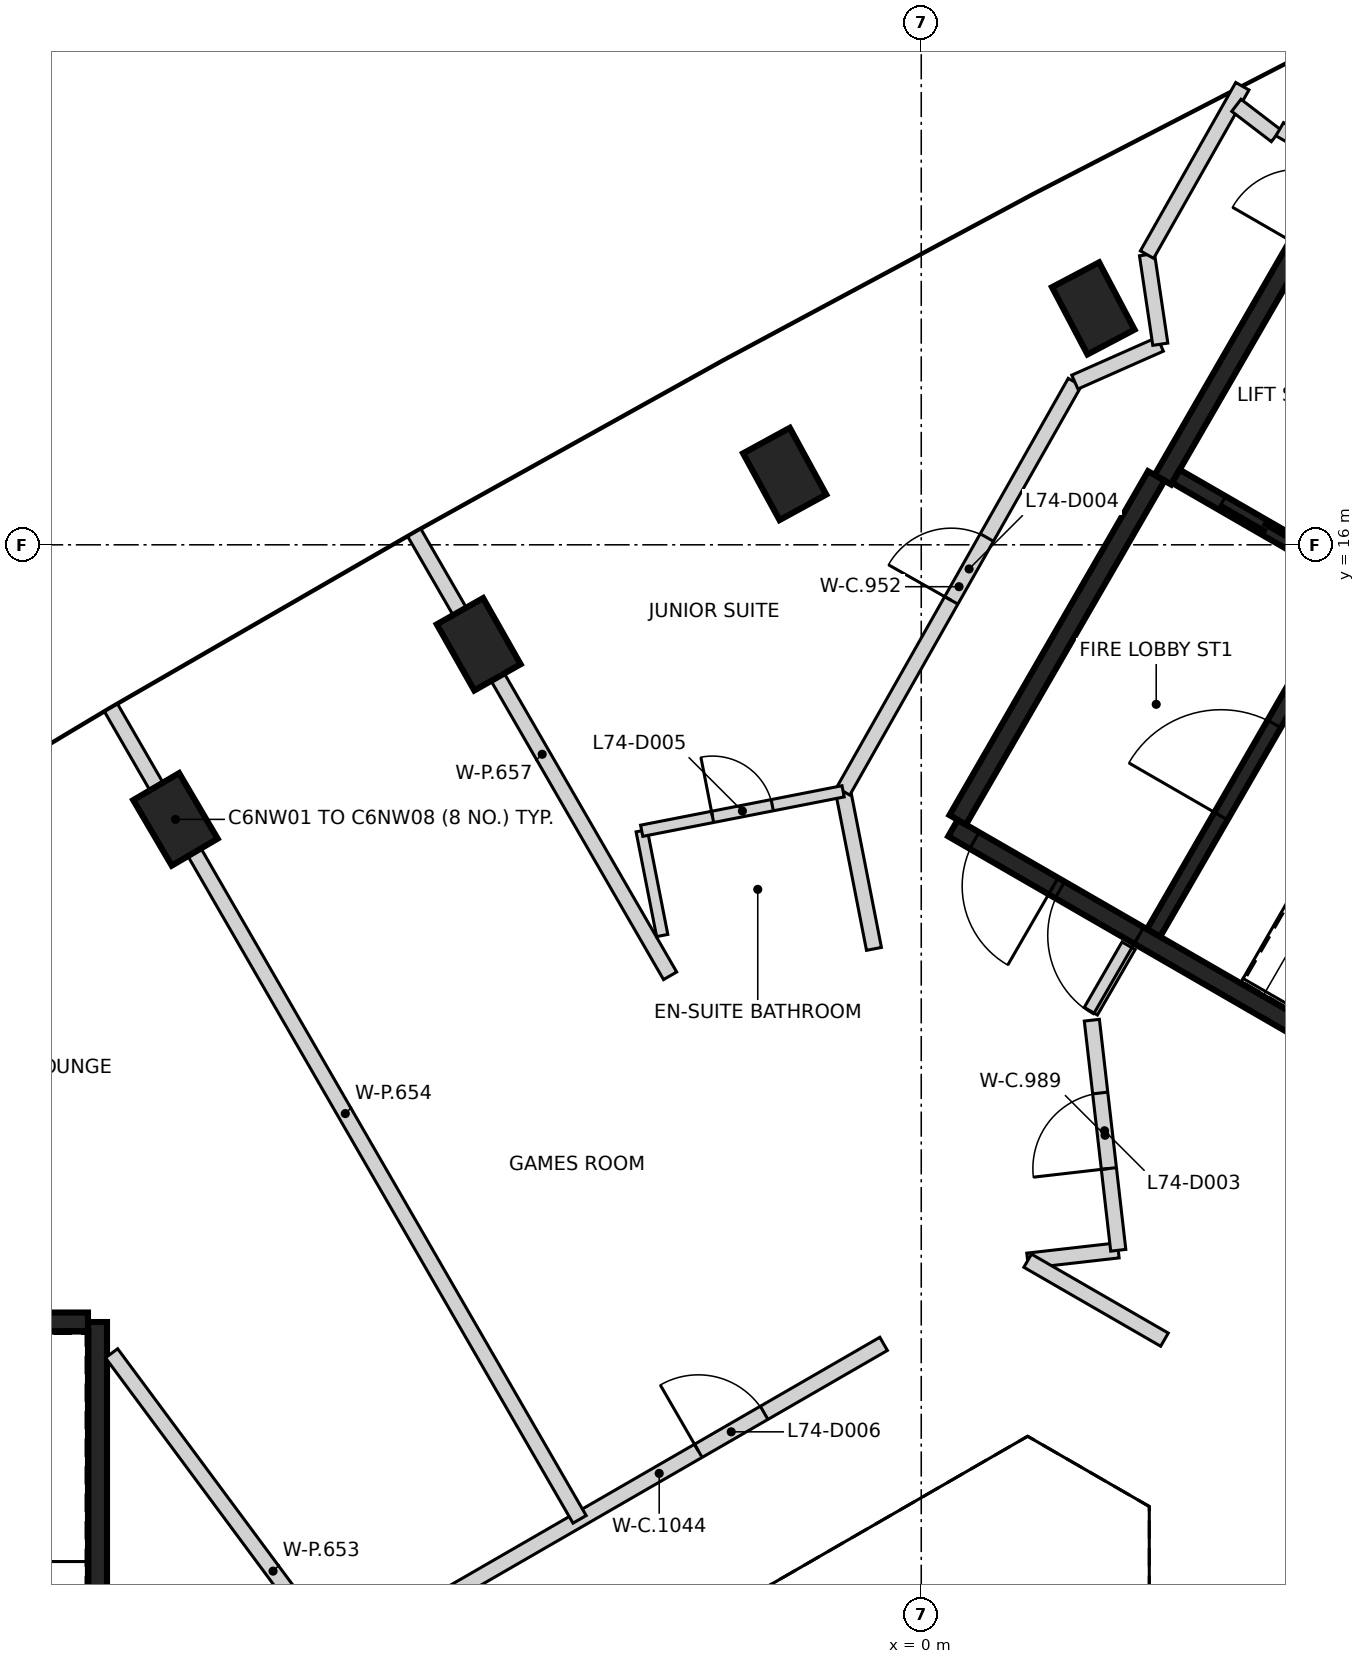
"""IFC4 building model, lengths in metres.
Left out: names, types, materials, properties, quantities, classifications, styles, units other than length and angle.
Written with IfcOpenShell. Run it as: python <this file> out.ifc"""

import sys

from ifc_helpers import new_model, si_unit, direction, frame, frame_2d, origin, origin_2d, place, context, subcontext, project, spatial, rectangle, extrude, element, fill, save


model = new_model("IFC4")
c1 = context("Model", 3, precision=1e-05, world=origin(), true_north=direction((0.0, 1.0)))
c2 = subcontext(c1, "Body", "Model", "MODEL_VIEW")
j1 = project(units=[si_unit("LENGTHUNIT", "METRE"), si_unit("PLANEANGLEUNIT", "RADIAN")], contexts=[c1])
p1 = place(None, origin())
s1 = spatial("IfcSite", under=j1, at=p1, CompositionType="ELEMENT")
p2 = place(p1, origin())
s2 = spatial("IfcBuilding", under=s1, at=p2, CompositionType="ELEMENT")
p3 = place(p2, frame((0.0, 0.0, 294.6)))
s3 = spatial("IfcBuildingStorey", under=s2, at=p3, CompositionType="ELEMENT", Elevation=294.6)
for number, where, z_axis, x_axis in (
    (1, (2.263, 19.11, -0.35), (0.0, 0.0, 1.0), (-0.466, 0.885, 0.0)),
    (2, (-1.797, 16.932, -0.35), (0.0, 0.0, 1.0), (-0.479, 0.878, 0.0)),
    (3, (-5.822, 14.691, -0.35), (0.0, 0.0, 1.0), (-0.493, 0.87, 0.0)),
    (4, (-9.812, 12.388, -0.35), (0.0, 0.0, 1.0), (-0.507, 0.862, 0.0)),
):
    element("IfcColumn", number, at=place(p3, frame(where, z_axis=z_axis, x_axis=x_axis)), inside=s3, PredefinedType="COLUMN", context=c2, shape_type="SweptSolid", body=[
        extrude(rectangle(XDim=1.0, YDim=0.7, at=origin_2d()), origin(), (0.0, 0.0, 1.0), 3.6),
    ])
p4 = place(p3, frame((-10.837, 5.775, 0.0), z_axis=(0.0, 0.0, 1.0), x_axis=(0.0, -1.0, 0.0)))
e5 = element("IfcWall", 5, at=p4, inside=s3, PredefinedType="SHEAR", context=c2, shape_type="SweptSolid", body=[
    extrude(rectangle(XDim=11.55, YDim=0.25, at=frame_2d((5.775, 0.0))), origin(), (0.0, 0.0, 1.0), 3.25),
])
p5 = place(p4, frame((10.025, 0.0, 0.0)))
e6 = element("IfcOpeningElement", 6, at=p5, cuts=e5, PredefinedType="OPENING", context=c2, shape_type="SweptSolid", body=[
    extrude(rectangle(XDim=1.2, YDim=2.1, at=frame_2d((0.6, 1.05))), frame((0.0, 0.135, 0.0), z_axis=(0.0, -1.0, 0.0), x_axis=(1.0, 0.0, 0.0)), (0.0, 0.0, 1.0), 0.27),
])
p6 = place(p4, frame((8.725, 0.0, 0.0)))
e7 = element("IfcOpeningElement", 7, at=p6, cuts=e5, PredefinedType="OPENING", context=c2, shape_type="SweptSolid", body=[
    extrude(rectangle(XDim=1.2, YDim=2.1, at=frame_2d((0.6, 1.05))), frame((0.0, 0.135, 0.0), z_axis=(0.0, -1.0, 0.0), x_axis=(1.0, 0.0, 0.0)), (0.0, 0.0, 1.0), 0.27),
])
p7 = place(p3, frame((-16.472, 5.775, 0.0), z_axis=(0.0, 0.0, 1.0), x_axis=(1.0, 0.0, 0.0)))
e8 = element("IfcWall", 8, at=p7, inside=s3, PredefinedType="SHEAR", context=c2, shape_type="SweptSolid", body=[
    extrude(rectangle(XDim=5.51, YDim=0.25, at=frame_2d((2.755, 0.0))), origin(), (0.0, 0.0, 1.0), 3.25),
])
p8 = place(p3, frame((10.42, 6.498, 0.0), z_axis=(0.0, 0.0, 1.0), x_axis=(-0.866021906294, 0.500006057782, 0.0)))
e9 = element("IfcWall", 9, at=p8, inside=s3, PredefinedType="SHEAR", context=c2, shape_type="SweptSolid", body=[
    extrude(rectangle(XDim=11.55, YDim=0.25, at=frame_2d((5.775, 0.0))), origin(), (0.0, 0.0, 1.0), 3.25),
])
p9 = place(p8, frame((10.025, 0.0, 0.0)))
e10 = element("IfcOpeningElement", 10, at=p9, cuts=e9, PredefinedType="OPENING", context=c2, shape_type="SweptSolid", body=[
    extrude(rectangle(XDim=1.2, YDim=2.1, at=frame_2d((0.6, 1.05))), frame((0.0, 0.135, 0.0), z_axis=(0.0, -1.0, 0.0), x_axis=(1.0, 0.0, 0.0)), (0.0, 0.0, 1.0), 0.27),
])
p10 = place(p8, frame((8.725, 0.0, 0.0)))
e11 = element("IfcOpeningElement", 11, at=p10, cuts=e9, PredefinedType="OPENING", context=c2, shape_type="SweptSolid", body=[
    extrude(rectangle(XDim=1.2, YDim=2.1, at=frame_2d((0.6, 1.05))), frame((0.0, 0.135, 0.0), z_axis=(0.0, -1.0, 0.0), x_axis=(1.0, 0.0, 0.0)), (0.0, 0.0, 1.0), 0.27),
])
p11 = place(p3, frame((3.179, 16.856, 0.0), z_axis=(0.0, 0.0, 1.0), x_axis=(0.500001955336, 0.866024274868, 0.0)))
e12 = element("IfcWall", 12, at=p11, inside=s3, PredefinedType="SHEAR", context=c2, shape_type="SweptSolid", body=[
    extrude(rectangle(XDim=6.125, YDim=0.25, at=frame_2d((3.062, 0.0))), origin(), (0.0, 0.0, 1.0), 3.25),
])
p12 = place(p11, frame((3.563, 0.0, 0.0)))
e13 = element("IfcOpeningElement", 13, at=p12, cuts=e12, PredefinedType="OPENING", context=c2, shape_type="SweptSolid", body=[
    extrude(rectangle(XDim=1.0, YDim=2.1, at=frame_2d((0.5, 1.05))), frame((0.0, 0.135, 0.0), z_axis=(0.0, -1.0, 0.0), x_axis=(1.0, 0.0, 0.0)), (0.0, 0.0, 1.0), 0.27),
])
p13 = place(p3, frame((0.48, 12.381, 0.0), z_axis=(0.0, 0.0, 1.0), x_axis=(0.49999885962, 0.866026062182, 0.0)))
e14 = element("IfcWall", 14, at=p13, inside=s3, PredefinedType="SHEAR", context=c2, shape_type="SweptSolid", body=[
    extrude(rectangle(XDim=5.225, YDim=0.25, at=frame_2d((2.612, 0.0))), origin(), (0.0, 0.0, 1.0), 3.25),
])
p14 = place(p3, frame((3.057, 10.895, 0.0), z_axis=(0.0, 0.0, 1.0), x_axis=(0.500027839223, 0.866009330205, 0.0)))
e15 = element("IfcWall", 15, at=p14, inside=s3, PredefinedType="SHEAR", context=c2, shape_type="SweptSolid", body=[
    extrude(rectangle(XDim=5.098, YDim=0.2, at=frame_2d((2.549, 0.0))), origin(), (0.0, 0.0, 1.0), 3.25),
])
p15 = place(p14, frame((1.774, 0.0, 0.0)))
e16 = element("IfcOpeningElement", 16, at=p15, cuts=e15, PredefinedType="OPENING", context=c2, shape_type="SweptSolid", body=[
    extrude(rectangle(XDim=1.4, YDim=2.1, at=frame_2d((0.7, 1.05))), frame((0.0, 0.11, 0.0), z_axis=(0.0, -1.0, 0.0), x_axis=(1.0, 0.0, 0.0)), (0.0, 0.0, 1.0), 0.22),
])
p16 = place(p3, frame((5.646, 15.576, 0.0), z_axis=(0.0, 0.0, 1.0), x_axis=(-0.866018407898, 0.500012117035, 0.0)))
e17 = element("IfcWall", 17, at=p16, inside=s3, PredefinedType="SHEAR", context=c2, shape_type="SweptSolid", body=[
    extrude(rectangle(XDim=2.651, YDim=0.2, at=frame_2d((1.325, 0.0))), origin(), (0.0, 0.0, 1.0), 3.25),
])
p17 = place(p16, frame((0.652, 0.0, 0.0)))
e18 = element("IfcOpeningElement", 18, at=p17, cuts=e17, PredefinedType="OPENING", context=c2, shape_type="SweptSolid", body=[
    extrude(rectangle(XDim=1.3, YDim=2.1, at=frame_2d((0.65, 1.05))), frame((0.0, 0.11, 0.0), z_axis=(0.0, -1.0, 0.0), x_axis=(1.0, 0.0, 0.0)), (0.0, 0.0, 1.0), 0.22),
])
p18 = place(p3, frame((-6.4, 2.079, 0.0), z_axis=(0.0, 0.0, 1.0), x_axis=(0.866037708501, 0.499978687001, 0.0)))
e19 = element("IfcWall", 19, at=p18, inside=s3, PredefinedType="PARTITIONING", context=c2, shape_type="SweptSolid", body=[
    extrude(rectangle(XDim=6.818, YDim=0.2, at=frame_2d((3.409, 0.0))), origin(), (0.0, 0.0, 1.0), 3.25),
])
p19 = place(p18, frame((4.003, 0.0, 0.0)))
e20 = element("IfcOpeningElement", 20, at=p19, cuts=e19, PredefinedType="OPENING", context=c2, shape_type="SweptSolid", body=[
    extrude(rectangle(XDim=1.0, YDim=2.1, at=frame_2d((0.5, 1.05))), frame((0.0, 0.11, 0.0), z_axis=(0.0, -1.0, 0.0), x_axis=(1.0, 0.0, 0.0)), (0.0, 0.0, 1.0), 0.22),
])
p20 = place(p3, frame((-1.028, 12.757, 0.0), z_axis=(0.0, 0.0, 1.0), x_axis=(0.192202773855, -0.981355233197, 0.0)))
e21 = element("IfcWall", 21, at=p20, inside=s3, PredefinedType="PARTITIONING", context=c2, shape_type="SweptSolid", body=[
    extrude(rectangle(XDim=2.112, YDim=0.2, at=frame_2d((1.056, 0.0))), origin(), (0.0, 0.0, 1.0), 3.25),
])
p21 = place(p3, frame((-1.027, 12.757, 0.0), z_axis=(0.0, 0.0, 1.0), x_axis=(0.492663063759, 0.870220147783, 0.0)))
e22 = element("IfcWall", 22, at=p21, inside=s3, PredefinedType="PARTITIONING", context=c2, shape_type="SweptSolid", body=[
    extrude(rectangle(XDim=6.187, YDim=0.2, at=frame_2d((3.094, 0.0))), origin(), (0.0, 0.0, 1.0), 3.25),
])
p22 = place(p21, frame((2.887, 0.0, 0.0)))
e23 = element("IfcOpeningElement", 23, at=p22, cuts=e22, PredefinedType="OPENING", context=c2, shape_type="SweptSolid", body=[
    extrude(rectangle(XDim=0.95, YDim=2.1, at=frame_2d((0.475, 1.05))), frame((0.0, 0.11, 0.0), z_axis=(0.0, -1.0, 0.0), x_axis=(1.0, 0.0, 0.0)), (0.0, 0.0, 1.0), 0.22),
])
p23 = place(p3, frame((1.4, 6.582, 0.0), z_axis=(0.0, 0.0, 1.0), x_axis=(0.993556915844, 0.11333426216, 0.0)))
e24 = element("IfcWall", 24, at=p23, inside=s3, PredefinedType="PARTITIONING", context=c2, shape_type="SweptSolid", body=[
    extrude(rectangle(XDim=1.2, YDim=0.2, at=frame_2d((0.6, 0.0))), origin(), (0.0, 0.0, 1.0), 3.25),
])
p24 = place(p3, frame((1.4, 6.582, 0.0), z_axis=(0.0, 0.0, 1.0), x_axis=(0.866066271601, -0.499929208183, 0.0)))
e25 = element("IfcWall", 25, at=p24, inside=s3, PredefinedType="PARTITIONING", context=c2, shape_type="SweptSolid", body=[
    extrude(rectangle(XDim=2.078, YDim=0.2, at=frame_2d((1.039, 0.0))), origin(), (0.0, 0.0, 1.0), 3.25),
])
p25 = place(p3, frame((2.021, 18.141, 0.0), z_axis=(0.0, 0.0, 1.0), x_axis=(0.914343087003, 0.404940389748, 0.0)))
e26 = element("IfcWall", 26, at=p25, inside=s3, PredefinedType="PARTITIONING", context=c2, shape_type="SweptSolid", body=[
    extrude(rectangle(XDim=1.229, YDim=0.2, at=frame_2d((0.615, 0.0))), origin(), (0.0, 0.0, 1.0), 3.25),
])
p26 = place(p3, frame((2.592, 6.719, 0.0), z_axis=(0.0, 0.0, 1.0), x_axis=(-0.114027951455, 0.993477541914, 0.0)))
e27 = element("IfcWall", 27, at=p26, inside=s3, PredefinedType="PARTITIONING", context=c2, shape_type="SweptSolid", body=[
    extrude(rectangle(XDim=3.047, YDim=0.2, at=frame_2d((1.523, 0.0))), origin(), (0.0, 0.0, 1.0), 3.25),
])
p27 = place(p26, frame((1.083, 0.0, 0.0)))
e28 = element("IfcOpeningElement", 28, at=p27, cuts=e27, PredefinedType="OPENING", context=c2, shape_type="SweptSolid", body=[
    extrude(rectangle(XDim=1.0, YDim=2.1, at=frame_2d((0.5, 1.05))), frame((0.0, 0.11, 0.0), z_axis=(0.0, -1.0, 0.0), x_axis=(1.0, 0.0, 0.0)), (0.0, 0.0, 1.0), 0.22),
])
p28 = place(p3, frame((2.231, 9.864, 0.0), z_axis=(0.0, 0.0, 1.0), x_axis=(0.499942098031, 0.866058830921, 0.0)))
e29 = element("IfcWall", 29, at=p28, inside=s3, PredefinedType="PARTITIONING", context=c2, shape_type="SweptSolid", body=[
    extrude(rectangle(XDim=0.994, YDim=0.2, at=frame_2d((0.497, 0.0))), origin(), (0.0, 0.0, 1.0), 3.25),
])
p29 = place(p3, frame((2.97, 19.817, 0.0), z_axis=(0.0, 0.0, 1.0), x_axis=(0.146986994932, -0.989138424752, 0.0)))
e30 = element("IfcWall", 30, at=p29, inside=s3, PredefinedType="PARTITIONING", context=c2, shape_type="SweptSolid", body=[
    extrude(rectangle(XDim=1.191, YDim=0.2, at=frame_2d((0.595, 0.0))), origin(), (0.0, 0.0, 1.0), 2.35),
])
p30 = place(p3, frame((2.97, 19.818, 0.0), z_axis=(0.0, 0.0, 1.0), x_axis=(0.492727027301, 0.870183932607, 0.0)))
e31 = element("IfcWall", 31, at=p30, inside=s3, PredefinedType="PARTITIONING", context=c2, shape_type="SweptSolid", body=[
    extrude(rectangle(XDim=2.546, YDim=0.2, at=frame_2d((1.273, 0.0))), origin(), (0.0, 0.0, 1.0), 3.25),
])
p31 = place(p3, frame((4.146, 21.782, 0.0), z_axis=(0.0, 0.0, 1.0), x_axis=(0.793977493121, -0.607947152652, 0.0)))
e32 = element("IfcWall", 32, at=p31, inside=s3, PredefinedType="PARTITIONING", context=c2, shape_type="SweptSolid", body=[
    extrude(rectangle(XDim=0.656, YDim=0.2, at=frame_2d((0.328, 0.0))), origin(), (0.0, 0.0, 1.0), 3.25),
])
p32 = place(p3, frame((4.716, 21.468, 0.0), z_axis=(0.0, 0.0, 1.0), x_axis=(0.865912682783, -0.500195187698, 0.0)))
e33 = element("IfcWall", 33, at=p32, inside=s3, PredefinedType="PARTITIONING", context=c2, shape_type="SweptSolid", body=[
    extrude(rectangle(XDim=0.79, YDim=0.2, at=frame_2d((0.395, 0.0))), origin(), (0.0, 0.0, 1.0), 3.25),
])
p33 = place(p3, frame((-10.652, 5.364, 0.0), z_axis=(0.0, 0.0, 1.0), x_axis=(0.595550732464, -0.803317698711, 0.0)))
e34 = element("IfcWall", 34, at=p33, inside=s3, PredefinedType="PARTITIONING", context=c2, shape_type="SweptSolid", body=[
    extrude(rectangle(XDim=7.135, YDim=0.2, at=frame_2d((3.567, 0.0))), origin(), (0.0, 0.0, 1.0), 3.25),
])
p34 = place(p3, frame((-10.659, 13.856, 0.0), z_axis=(0.0, 0.0, 1.0), x_axis=(0.500004723409, -0.866022676706, 0.0)))
e35 = element("IfcWall", 35, at=p34, inside=s3, PredefinedType="PARTITIONING", context=c2, shape_type="SweptSolid", body=[
    extrude(rectangle(XDim=12.329, YDim=0.2, at=frame_2d((6.164, 0.0))), origin(), (0.0, 0.0, 1.0), 3.25),
])
p35 = place(p3, frame((-6.67, 16.159, 0.0), z_axis=(0.0, 0.0, 1.0), x_axis=(0.50003223478, -0.866006792225, 0.0)))
e36 = element("IfcWall", 36, at=p35, inside=s3, PredefinedType="PARTITIONING", context=c2, shape_type="SweptSolid", body=[
    extrude(rectangle(XDim=6.731, YDim=0.2, at=frame_2d((3.365, 0.0))), origin(), (0.0, 0.0, 1.0), 3.25),
])
p36 = place(p3, frame((-3.678, 12.238, 0.0), z_axis=(0.0, 0.0, 1.0), x_axis=(0.192270029527, -0.981342058482, 0.0)))
e37 = element("IfcWall", 37, at=p36, inside=s3, PredefinedType="PARTITIONING", context=c2, shape_type="SweptSolid", body=[
    extrude(rectangle(XDim=1.404, YDim=0.15, at=frame_2d((0.702, 0.0))), origin(), (0.0, 0.0, 1.0), 3.25),
])
p37 = place(p3, frame((-3.678, 12.238, 0.0), z_axis=(0.0, 0.0, 1.0), x_axis=(0.98135189098, 0.192219837868, 0.0)))
e38 = element("IfcWall", 38, at=p37, inside=s3, PredefinedType="PARTITIONING", context=c2, shape_type="SweptSolid", body=[
    extrude(rectangle(XDim=2.7, YDim=0.15, at=frame_2d((1.35, 0.0))), origin(), (0.0, 0.0, 1.0), 3.25),
])
p38 = place(p37, frame((0.95, 0.0, 0.0)))
e39 = element("IfcOpeningElement", 39, at=p38, cuts=e38, PredefinedType="OPENING", context=c2, shape_type="SweptSolid", body=[
    extrude(rectangle(XDim=0.8, YDim=2.1, at=frame_2d((0.4, 1.05))), frame((0.0, 0.085, 0.0), z_axis=(0.0, -1.0, 0.0), x_axis=(1.0, 0.0, 0.0)), (0.0, 0.0, 1.0), 0.17),
])
p39 = place(p17, origin())
e40 = element("IfcDoor", 40, at=p39, inside=s3, OperationType="SLIDING_TO_RIGHT", PredefinedType="DOOR", context=c2, shape_type="SweptSolid", body=[
    extrude(rectangle(XDim=1.3, YDim=2.1, at=frame_2d((0.65, 1.05))), frame((0.0, 0.025, 0.0), z_axis=(0.0, -1.0, 0.0), x_axis=(1.0, 0.0, 0.0)), (0.0, 0.0, 1.0), 0.05),
])
fill(e18, e40)
p40 = place(p9, origin())
e41 = element("IfcDoor", 41, at=p40, inside=s3, OperationType="SINGLE_SWING_LEFT", PredefinedType="DOOR", context=c2, shape_type="SweptSolid", body=[
    extrude(rectangle(XDim=1.2, YDim=2.1, at=frame_2d((0.6, 1.05))), frame((0.0, 0.025, 0.0), z_axis=(0.0, -1.0, 0.0), x_axis=(1.0, 0.0, 0.0)), (0.0, 0.0, 1.0), 0.05),
])
fill(e10, e41)
p41 = place(p10, origin())
e42 = element("IfcDoor", 42, at=p41, inside=s3, OperationType="SINGLE_SWING_RIGHT", PredefinedType="DOOR", context=c2, shape_type="SweptSolid", body=[
    extrude(rectangle(XDim=1.2, YDim=2.1, at=frame_2d((0.6, 1.05))), frame((0.0, 0.025, 0.0), z_axis=(0.0, -1.0, 0.0), x_axis=(1.0, 0.0, 0.0)), (0.0, 0.0, 1.0), 0.05),
])
fill(e11, e42)
p42 = place(p15, origin())
e43 = element("IfcDoor", 43, at=p42, inside=s3, OperationType="SINGLE_SWING_RIGHT", PredefinedType="DOOR", context=c2, shape_type="SweptSolid", body=[
    extrude(rectangle(XDim=1.4, YDim=2.1, at=frame_2d((0.7, 1.05))), frame((0.0, 0.025, 0.0), z_axis=(0.0, -1.0, 0.0), x_axis=(1.0, 0.0, 0.0)), (0.0, 0.0, 1.0), 0.05),
])
fill(e16, e43)
p43 = place(p27, origin())
e44 = element("IfcDoor", 44, at=p43, inside=s3, OperationType="SINGLE_SWING_LEFT", PredefinedType="DOOR", context=c2, shape_type="SweptSolid", body=[
    extrude(rectangle(XDim=1.0, YDim=2.1, at=frame_2d((0.5, 1.05))), frame((0.0, 0.025, 0.0), z_axis=(0.0, -1.0, 0.0), x_axis=(1.0, 0.0, 0.0)), (0.0, 0.0, 1.0), 0.05),
])
fill(e28, e44)
p44 = place(p22, origin())
e45 = element("IfcDoor", 45, at=p44, inside=s3, OperationType="SINGLE_SWING_LEFT", PredefinedType="DOOR", context=c2, shape_type="SweptSolid", body=[
    extrude(rectangle(XDim=0.95, YDim=2.1, at=frame_2d((0.475, 1.05))), frame((0.0, 0.025, 0.0), z_axis=(0.0, -1.0, 0.0), x_axis=(1.0, 0.0, 0.0)), (0.0, 0.0, 1.0), 0.05),
])
fill(e23, e45)
p45 = place(p38, origin())
e46 = element("IfcDoor", 46, at=p45, inside=s3, OperationType="SINGLE_SWING_LEFT", PredefinedType="DOOR", context=c2, shape_type="SweptSolid", body=[
    extrude(rectangle(XDim=0.8, YDim=2.1, at=frame_2d((0.4, 1.05))), frame((0.0, 0.025, 0.0), z_axis=(0.0, -1.0, 0.0), x_axis=(1.0, 0.0, 0.0)), (0.0, 0.0, 1.0), 0.05),
])
fill(e39, e46)
p46 = place(p19, origin())
e47 = element("IfcDoor", 47, at=p46, inside=s3, OperationType="SINGLE_SWING_LEFT", PredefinedType="DOOR", context=c2, shape_type="SweptSolid", body=[
    extrude(rectangle(XDim=1.0, YDim=2.1, at=frame_2d((0.5, 1.05))), frame((0.0, 0.025, 0.0), z_axis=(0.0, -1.0, 0.0), x_axis=(1.0, 0.0, 0.0)), (0.0, 0.0, 1.0), 0.05),
])
fill(e20, e47)
save(model, sys.argv[1])
